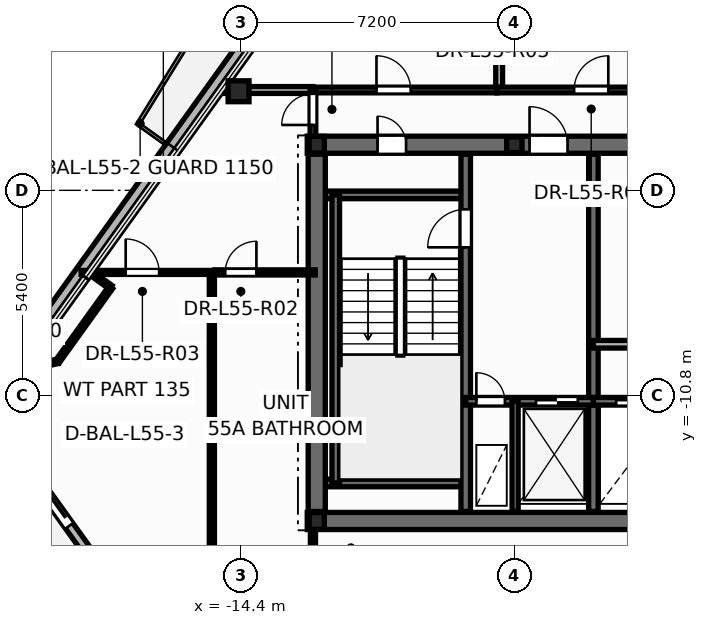
"""IFC4 building model, lengths in metres.
Left out: names, types, materials, properties, quantities, classifications, styles, units other than length and angle.
Written with IfcOpenShell. Run it as: python <this file> out.ifc"""

import sys

from ifc_helpers import new_model, si_unit, direction, frame, frame_2d, origin, origin_2d, place, context, subcontext, project, spatial, rectangle, hollow_circle, i_section, extrude, element, fill, save


model = new_model("IFC4")
c1 = context("Model", 3, precision=1e-05, world=origin(), true_north=direction((0.0, 1.0)))
c2 = subcontext(c1, "Body", "Model", "MODEL_VIEW")
j1 = project(units=[si_unit("LENGTHUNIT", "METRE"), si_unit("PLANEANGLEUNIT", "RADIAN")], contexts=[c1])
p1 = place(None, origin())
s1 = spatial("IfcSite", under=j1, at=p1, CompositionType="ELEMENT")
p2 = place(p1, origin())
s2 = spatial("IfcBuilding", under=s1, at=p2, CompositionType="ELEMENT")
p3 = place(p2, frame((0.0, 0.0, 210.9)))
s3 = spatial("IfcBuildingStorey", under=s2, at=p3, CompositionType="ELEMENT", Elevation=210.9)
p4 = place(p3, frame((-14.457, -2.793, 0.0), z_axis=(0.0, 0.0, 1.0), x_axis=(1.0, 0.0, 0.0)))
e1 = element("IfcColumn", 1, at=p4, inside=s3, PredefinedType="COLUMN", context=c2, shape_type="SweptSolid", body=[
    extrude(hollow_circle(Radius=0.275, WallThickness=0.024, at=origin_2d()), origin(), (0.0, 0.0, 1.0), 3.6),
])
for number, where, z_axis, x_axis in (
    (2, (-12.4, -14.1, 0.0), (0.0, 0.0, 1.0), (1.0, 0.0, 0.0)),
    (3, (-12.4, -4.2, 0.0), (0.0, 0.0, 1.0), (1.0, 0.0, 0.0)),
):
    element("IfcColumn", number, at=place(p3, frame(where, z_axis=z_axis, x_axis=x_axis)), inside=s3, PredefinedType="COLUMN", context=c2, shape_type="SweptSolid", body=[
        extrude(i_section(OverallWidth=0.4, OverallDepth=0.44, WebThickness=0.028, FlangeThickness=0.04, at=origin_2d()), origin(), (0.0, 0.0, 1.0), 3.6),
    ])
p5 = place(p3, frame((-7.2, -4.2, 0.0), z_axis=(0.0, 0.0, 1.0), x_axis=(1.0, 0.0, 0.0)))
e4 = element("IfcColumn", 4, at=p5, inside=s3, PredefinedType="PILASTER", context=c2, shape_type="SweptSolid", body=[
    extrude(i_section(OverallWidth=0.405, OverallDepth=0.414, WebThickness=0.022, FlangeThickness=0.032, at=origin_2d()), origin(), (0.0, 0.0, 1.0), 3.6),
])
p6 = place(p3, frame((-12.032, 1.541, -0.2), z_axis=(0.0, 0.0, 1.0), x_axis=(-0.583546701141, -0.812079582053, 0.0)))
e5 = element("IfcWall", 5, at=p6, inside=s3, PredefinedType="PARAPET", context=c2, shape_type="SweptSolid", body=[
    extrude(rectangle(XDim=15.541, YDim=0.36, at=frame_2d((7.77, 0.0))), origin(), (0.0, 0.0, 1.0), 0.38),
])
p7 = place(p3, frame((-19.976, -12.751, -0.015), z_axis=(0.0, 0.0, 1.0), x_axis=(0.5835494265, -0.812077623649, 0.0)))
e6 = element("IfcWall", 6, at=p7, inside=s3, PredefinedType="STANDARD", context=c2, shape_type="SweptSolid", body=[
    extrude(rectangle(XDim=3.833, YDim=0.24, at=frame_2d((1.917, 0.0))), origin(), (0.0, 0.0, 1.0), 2.802),
])
p8 = place(p7, frame((0.32, 0.0, 0.015)))
e7 = element("IfcOpeningElement", 7, at=p8, cuts=e6, PredefinedType="OPENING", context=c2, shape_type="SweptSolid", body=[
    extrude(rectangle(XDim=1.506, YDim=2.204, at=frame_2d((0.75, 1.102))), frame((0.0, 0.13, 0.0), z_axis=(0.0, -1.0, 0.0), x_axis=(1.0, 0.0, 0.0)), (0.0, 0.0, 1.0), 0.26),
])
p9 = place(p3, frame((-12.65, -14.1, 0.0), z_axis=(0.0, 0.0, 1.0), x_axis=(1.0, 0.0, 0.0)))
e8 = element("IfcWall", 8, at=p9, inside=s3, PredefinedType="SHEAR", context=c2, shape_type="SweptSolid", body=[
    extrude(rectangle(XDim=25.3, YDim=0.45, at=frame_2d((12.65, 0.0))), origin(), (0.0, 0.0, 1.0), 3.6),
])
p10 = place(p3, frame((-12.65, -4.2, 0.0), z_axis=(0.0, 0.0, 1.0), x_axis=(1.0, 0.0, 0.0)))
e9 = element("IfcWall", 9, at=p10, inside=s3, PredefinedType="SHEAR", context=c2, shape_type="SweptSolid", body=[
    extrude(rectangle(XDim=25.3, YDim=0.45, at=frame_2d((12.65, 0.0))), origin(), (0.0, 0.0, 1.0), 3.6),
])
p11 = place(p10, frame((1.85, 0.0, 0.0)))
e10 = element("IfcOpeningElement", 10, at=p11, cuts=e9, PredefinedType="OPENING", context=c2, shape_type="SweptSolid", body=[
    extrude(rectangle(XDim=0.756, YDim=2.054, at=frame_2d((0.375, 1.027))), frame((0.0, 0.235, 0.0), z_axis=(0.0, -1.0, 0.0), x_axis=(1.0, 0.0, 0.0)), (0.0, 0.0, 1.0), 0.47),
])
p12 = place(p10, frame((21.85, 0.0, 0.0)))
e11 = element("IfcOpeningElement", 11, at=p12, cuts=e9, PredefinedType="OPENING", context=c2, shape_type="SweptSolid", body=[
    extrude(rectangle(XDim=0.756, YDim=2.054, at=frame_2d((0.375, 1.027))), frame((0.0, 0.235, 0.0), z_axis=(0.0, -1.0, 0.0), x_axis=(1.0, 0.0, 0.0)), (0.0, 0.0, 1.0), 0.47),
])
p13 = place(p10, frame((23.5, 0.0, 0.0)))
e12 = element("IfcOpeningElement", 12, at=p13, cuts=e9, PredefinedType="OPENING", context=c2, shape_type="SweptSolid", body=[
    extrude(rectangle(XDim=0.756, YDim=2.054, at=frame_2d((0.375, 1.027))), frame((0.0, 0.235, 0.0), z_axis=(0.0, -1.0, 0.0), x_axis=(1.0, 0.0, 0.0)), (0.0, 0.0, 1.0), 0.47),
])
p14 = place(p10, frame((5.85, 0.0, 0.0)))
e13 = element("IfcOpeningElement", 13, at=p14, cuts=e9, PredefinedType="OPENING", context=c2, shape_type="SweptSolid", body=[
    extrude(rectangle(XDim=1.006, YDim=2.104, at=frame_2d((0.5, 1.052))), frame((0.0, 0.235, 0.0), z_axis=(0.0, -1.0, 0.0), x_axis=(1.0, 0.0, 0.0)), (0.0, 0.0, 1.0), 0.47),
])
p15 = place(p10, frame((10.35, 0.0, 0.0)))
e14 = element("IfcOpeningElement", 14, at=p15, cuts=e9, PredefinedType="OPENING", context=c2, shape_type="SweptSolid", body=[
    extrude(rectangle(XDim=1.406, YDim=2.154, at=frame_2d((0.7, 1.077))), frame((0.0, 0.235, 0.0), z_axis=(0.0, -1.0, 0.0), x_axis=(1.0, 0.0, 0.0)), (0.0, 0.0, 1.0), 0.47),
])
p16 = place(p10, frame((18.45, 0.0, 0.0)))
e15 = element("IfcOpeningElement", 15, at=p16, cuts=e9, PredefinedType="OPENING", context=c2, shape_type="SweptSolid", body=[
    extrude(rectangle(XDim=1.006, YDim=2.104, at=frame_2d((0.5, 1.052))), frame((0.0, 0.235, 0.0), z_axis=(0.0, -1.0, 0.0), x_axis=(1.0, 0.0, 0.0)), (0.0, 0.0, 1.0), 0.47),
])
for number, where, z_axis, x_axis in (
    (16, (-12.35, -5.52, 0.0), (0.0, 0.0, 1.0), (1.0, 0.0, 0.0)),
    (17, (-12.35, -13.1, 0.0), (0.0, 0.0, 1.0), (1.0, 0.0, 0.0)),
):
    element("IfcWall", number, at=place(p3, frame(where, z_axis=z_axis, x_axis=x_axis)), inside=s3, PredefinedType="SOLIDWALL", context=c2, shape_type="SweptSolid", body=[
        extrude(rectangle(XDim=3.87, YDim=0.2, at=frame_2d((1.935, 0.0))), origin(), (0.0, 0.0, 1.0), 3.6),
    ])
p17 = place(p3, frame((-11.9, -13.1, 0.0), z_axis=(0.0, 0.0, 1.0), x_axis=(0.0, 1.0, 0.0)))
e18 = element("IfcWall", 18, at=p17, inside=s3, PredefinedType="SOLIDWALL", context=c2, shape_type="SweptSolid", body=[
    extrude(rectangle(XDim=7.58, YDim=0.2, at=frame_2d((3.79, 0.0))), origin(), (0.0, 0.0, 1.0), 3.6),
])
p18 = place(p3, frame((-8.48, -13.85, 0.0), z_axis=(0.0, 0.0, 1.0), x_axis=(0.0, 1.0, 0.0)))
e19 = element("IfcWall", 19, at=p18, inside=s3, PredefinedType="SHEAR", context=c2, shape_type="SweptSolid", body=[
    extrude(rectangle(XDim=9.4, YDim=0.25, at=frame_2d((4.7, 0.0))), origin(), (0.0, 0.0, 1.0), 3.6),
])
p19 = place(p18, frame((6.95, 0.0, 0.0)))
e20 = element("IfcOpeningElement", 20, at=p19, cuts=e19, PredefinedType="OPENING", context=c2, shape_type="SweptSolid", body=[
    extrude(rectangle(XDim=1.006, YDim=2.104, at=frame_2d((0.5, 1.052))), frame((0.0, 0.135, 0.0), z_axis=(0.0, -1.0, 0.0), x_axis=(1.0, 0.0, 0.0)), (0.0, 0.0, 1.0), 0.27),
])
p20 = place(p3, frame((-5.12, -13.85, 0.0), z_axis=(0.0, 0.0, 1.0), x_axis=(0.0, 1.0, 0.0)))
e21 = element("IfcWall", 21, at=p20, inside=s3, PredefinedType="SHEAR", context=c2, shape_type="SweptSolid", body=[
    extrude(rectangle(XDim=9.4, YDim=0.25, at=frame_2d((4.7, 0.0))), origin(), (0.0, 0.0, 1.0), 3.6),
])
p21 = place(p3, frame((-8.48, -10.95, 0.0), z_axis=(0.0, 0.0, 1.0), x_axis=(1.0, 0.0, 0.0)))
e22 = element("IfcWall", 22, at=p21, inside=s3, PredefinedType="SOLIDWALL", context=c2, shape_type="SweptSolid", body=[
    extrude(rectangle(XDim=3.36, YDim=0.2, at=frame_2d((1.68, 0.0))), origin(), (0.0, 0.0, 1.0), 3.6),
])
p22 = place(p21, frame((0.28, 0.0, 0.0)))
e23 = element("IfcOpeningElement", 23, at=p22, cuts=e22, PredefinedType="OPENING", context=c2, shape_type="SweptSolid", body=[
    extrude(rectangle(XDim=0.756, YDim=2.054, at=frame_2d((0.375, 1.027))), frame((0.0, 0.11, 0.0), z_axis=(0.0, -1.0, 0.0), x_axis=(1.0, 0.0, 0.0)), (0.0, 0.0, 1.0), 0.22),
])
p23 = place(p21, frame((1.85, 0.0, 0.0)))
e24 = element("IfcOpeningElement", 24, at=p23, cuts=e22, PredefinedType="OPENING", context=c2, shape_type="SweptSolid", body=[
    extrude(rectangle(XDim=1.106, YDim=2.104, at=frame_2d((0.55, 1.052))), frame((0.0, 0.11, 0.0), z_axis=(0.0, -1.0, 0.0), x_axis=(1.0, 0.0, 0.0)), (0.0, 0.0, 1.0), 0.22),
])
p24 = place(p3, frame((-5.12, -10.95, 0.0), z_axis=(0.0, 0.0, 1.0), x_axis=(1.0, 0.0, 0.0)))
e25 = element("IfcWall", 25, at=p24, inside=s3, PredefinedType="SOLIDWALL", context=c2, shape_type="SweptSolid", body=[
    extrude(rectangle(XDim=10.24, YDim=0.2, at=frame_2d((5.12, 0.0))), origin(), (0.0, 0.0, 1.0), 3.6),
])
p25 = place(p24, frame((0.6, 0.0, 0.0)))
e26 = element("IfcOpeningElement", 26, at=p25, cuts=e25, PredefinedType="OPENING", context=c2, shape_type="SweptSolid", body=[
    extrude(rectangle(XDim=1.106, YDim=2.104, at=frame_2d((0.55, 1.052))), frame((0.0, 0.11, 0.0), z_axis=(0.0, -1.0, 0.0), x_axis=(1.0, 0.0, 0.0)), (0.0, 0.0, 1.0), 0.22),
])
p26 = place(p24, frame((2.67, 0.0, 0.0)))
e27 = element("IfcOpeningElement", 27, at=p26, cuts=e25, PredefinedType="OPENING", context=c2, shape_type="SweptSolid", body=[
    extrude(rectangle(XDim=1.106, YDim=2.104, at=frame_2d((0.55, 1.052))), frame((0.0, 0.11, 0.0), z_axis=(0.0, -1.0, 0.0), x_axis=(1.0, 0.0, 0.0)), (0.0, 0.0, 1.0), 0.22),
])
p27 = place(p24, frame((4.57, 0.0, 0.0)))
e28 = element("IfcOpeningElement", 28, at=p27, cuts=e25, PredefinedType="OPENING", context=c2, shape_type="SweptSolid", body=[
    extrude(rectangle(XDim=1.106, YDim=2.104, at=frame_2d((0.55, 1.052))), frame((0.0, 0.11, 0.0), z_axis=(0.0, -1.0, 0.0), x_axis=(1.0, 0.0, 0.0)), (0.0, 0.0, 1.0), 0.22),
])
p28 = place(p24, frame((6.47, 0.0, 0.0)))
e29 = element("IfcOpeningElement", 29, at=p28, cuts=e25, PredefinedType="OPENING", context=c2, shape_type="SweptSolid", body=[
    extrude(rectangle(XDim=1.106, YDim=2.104, at=frame_2d((0.55, 1.052))), frame((0.0, 0.11, 0.0), z_axis=(0.0, -1.0, 0.0), x_axis=(1.0, 0.0, 0.0)), (0.0, 0.0, 1.0), 0.22),
])
p29 = place(p24, frame((8.54, 0.0, 0.0)))
e30 = element("IfcOpeningElement", 30, at=p29, cuts=e25, PredefinedType="OPENING", context=c2, shape_type="SweptSolid", body=[
    extrude(rectangle(XDim=1.106, YDim=2.104, at=frame_2d((0.55, 1.052))), frame((0.0, 0.11, 0.0), z_axis=(0.0, -1.0, 0.0), x_axis=(1.0, 0.0, 0.0)), (0.0, 0.0, 1.0), 0.22),
])
p30 = place(p3, frame((-7.18, -13.85, 0.0), z_axis=(0.0, 0.0, 1.0), x_axis=(0.0, 1.0, 0.0)))
e31 = element("IfcWall", 31, at=p30, inside=s3, PredefinedType="PARTITIONING", context=c2, shape_type="SweptSolid", body=[
    extrude(rectangle(XDim=2.9, YDim=0.16, at=frame_2d((1.45, 0.0))), origin(), (0.0, 0.0, 1.0), 2.47),
])
p31 = place(p3, frame((-12.4, -13.85, 0.0), z_axis=(0.0, 0.0, 1.0), x_axis=(0.0, 1.0, 0.0)))
e32 = element("IfcWall", 32, at=p31, inside=s3, PredefinedType="SHEAR", context=c2, shape_type="SweptSolid", body=[
    extrude(rectangle(XDim=9.4, YDim=0.45, at=frame_2d((4.7, 0.0))), origin(), (0.0, 0.0, 1.0), 3.6),
])
p32 = place(p3, frame((-5.12, -9.45, 0.0), z_axis=(0.0, 0.0, 1.0), x_axis=(1.0, 0.0, 0.0)))
e33 = element("IfcWall", 33, at=p32, inside=s3, PredefinedType="SOLIDWALL", context=c2, shape_type="SweptSolid", body=[
    extrude(rectangle(XDim=2.24, YDim=0.2, at=frame_2d((1.12, 0.0))), origin(), (0.0, 0.0, 1.0), 3.345),
])
p33 = place(p3, frame((-15.16, -15.897, 0.0), z_axis=(0.0, 0.0, 1.0), x_axis=(0.0, 1.0, 0.0)))
e34 = element("IfcWall", 34, at=p33, inside=s3, PredefinedType="PARTITIONING", context=c2, shape_type="SweptSolid", body=[
    extrude(rectangle(XDim=8.337, YDim=0.135, at=frame_2d((4.168, 0.0))), origin(), (0.0, 0.0, 1.0), 2.787),
])
p34 = place(p3, frame((-7.6, -2.76, 0.0), z_axis=(0.0, 0.0, 1.0), x_axis=(0.0, 1.0, 0.0)))
e35 = element("IfcWall", 35, at=p34, inside=s3, PredefinedType="PARTITIONING", context=c2, shape_type="SweptSolid", body=[
    extrude(rectangle(XDim=10.195, YDim=0.18, at=frame_2d((5.098, 0.0))), origin(), (0.0, 0.0, 1.0), 2.62),
])
p35 = place(p3, frame((-7.66, -2.76, 0.0), z_axis=(0.0, 0.0, 1.0), x_axis=(1.0, 0.0, 0.0)))
e36 = element("IfcWall", 36, at=p35, inside=s3, PredefinedType="PARTITIONING", context=c2, shape_type="SweptSolid", body=[
    extrude(rectangle(XDim=6.12, YDim=0.15, at=frame_2d((3.06, 0.0))), origin(), (0.0, 0.0, 1.0), 2.32),
])
p36 = place(p35, frame((2.032, 0.0, 0.0)))
e37 = element("IfcOpeningElement", 37, at=p36, cuts=e36, PredefinedType="OPENING", context=c2, shape_type="SweptSolid", body=[
    extrude(rectangle(XDim=0.906, YDim=2.104, at=frame_2d((0.45, 1.052))), frame((0.0, 0.085, 0.0), z_axis=(0.0, -1.0, 0.0), x_axis=(1.0, 0.0, 0.0)), (0.0, 0.0, 1.0), 0.17),
])
p37 = place(p3, frame((-12.5, -2.76, 0.0), z_axis=(0.0, 0.0, 1.0), x_axis=(1.0, 0.0, 0.0)))
e38 = element("IfcWall", 38, at=p37, inside=s3, PredefinedType="PARTITIONING", context=c2, shape_type="SweptSolid", body=[
    extrude(rectangle(XDim=4.838, YDim=0.15, at=frame_2d((2.419, 0.0))), origin(), (0.0, 0.0, 1.0), 3.345),
])
p38 = place(p37, frame((1.672, 0.0, 0.0)))
e39 = element("IfcOpeningElement", 39, at=p38, cuts=e38, PredefinedType="OPENING", context=c2, shape_type="SweptSolid", body=[
    extrude(rectangle(XDim=0.906, YDim=2.104, at=frame_2d((0.45, 1.052))), frame((0.0, 0.085, 0.0), z_axis=(0.0, -1.0, 0.0), x_axis=(1.0, 0.0, 0.0)), (0.0, 0.0, 1.0), 0.17),
])
p39 = place(p3, frame((-18.6, -7.56, 0.0), z_axis=(0.0, 0.0, 1.0), x_axis=(1.0, 0.0, 0.0)))
e40 = element("IfcWall", 40, at=p39, inside=s3, PredefinedType="PARTITIONING", context=c2, shape_type="SweptSolid", body=[
    extrude(rectangle(XDim=3.52, YDim=0.105, at=frame_2d((1.76, 0.0))), origin(), (0.0, 0.0, 1.0), 2.32),
])
p40 = place(p39, frame((1.172, 0.0, 0.0)))
e41 = element("IfcOpeningElement", 41, at=p40, cuts=e40, PredefinedType="OPENING", context=c2, shape_type="SweptSolid", body=[
    extrude(rectangle(XDim=0.886, YDim=2.104, at=frame_2d((0.44, 1.052))), frame((0.0, 0.062, 0.0), z_axis=(0.0, -1.0, 0.0), x_axis=(1.0, 0.0, 0.0)), (0.0, 0.0, 1.0), 0.125),
])
p41 = place(p3, frame((-15.078, -7.56, 0.0), z_axis=(0.0, 0.0, 1.0), x_axis=(1.0, 0.0, 0.0)))
e42 = element("IfcWall", 42, at=p41, inside=s3, PredefinedType="PARTITIONING", context=c2, shape_type="SweptSolid", body=[
    extrude(rectangle(XDim=2.638, YDim=0.135, at=frame_2d((1.319, 0.0))), origin(), (0.0, 0.0, 1.0), 2.787),
])
p42 = place(p41, frame((0.271, 0.0, 0.0)))
e43 = element("IfcOpeningElement", 43, at=p42, cuts=e42, PredefinedType="OPENING", context=c2, shape_type="SweptSolid", body=[
    extrude(rectangle(XDim=0.826, YDim=2.104, at=frame_2d((0.41, 1.052))), frame((0.0, 0.078, 0.0), z_axis=(0.0, -1.0, 0.0), x_axis=(1.0, 0.0, 0.0)), (0.0, 0.0, 1.0), 0.155),
])
p43 = place(p3, frame((-14.926, -2.76, 0.0), z_axis=(0.0, 0.0, 1.0), x_axis=(1.0, 0.0, 0.0)))
e44 = element("IfcWall", 44, at=p43, inside=s3, PredefinedType="PARTITIONING", context=c2, shape_type="SweptSolid", body=[
    extrude(rectangle(XDim=2.426, YDim=0.18, at=frame_2d((1.213, 0.0))), origin(), (0.0, 0.0, 1.0), 2.62),
])
p44 = place(p3, frame((-17.82, -7.953, 0.0), z_axis=(0.0, 0.0, 1.0), x_axis=(-0.583516561227, -0.812101239239, 0.0)))
e45 = element("IfcWall", 45, at=p44, inside=s3, PredefinedType="PARTITIONING", context=c2, shape_type="SweptSolid", body=[
    extrude(rectangle(XDim=2.4, YDim=0.12, at=frame_2d((1.2, 0.0))), origin(), (0.0, 0.0, 1.0), 2.32),
])
p45 = place(p3, frame((-12.5, -4.24, 0.0), z_axis=(0.0, 0.0, 1.0), x_axis=(0.0, 1.0, 0.0)))
e46 = element("IfcWall", 46, at=p45, inside=s3, PredefinedType="PARTITIONING", context=c2, shape_type="SweptSolid", body=[
    extrude(rectangle(XDim=1.48, YDim=0.15, at=frame_2d((0.74, 0.0))), origin(), (0.0, 0.0, 1.0), 2.32),
])
p46 = place(p45, frame((0.56, 0.0, 0.0)))
e47 = element("IfcOpeningElement", 47, at=p46, cuts=e46, PredefinedType="OPENING", context=c2, shape_type="SweptSolid", body=[
    extrude(rectangle(XDim=0.826, YDim=2.104, at=frame_2d((0.41, 1.052))), frame((0.0, 0.085, 0.0), z_axis=(0.0, -1.0, 0.0), x_axis=(1.0, 0.0, 0.0)), (0.0, 0.0, 1.0), 0.17),
])
p47 = place(p3, frame((-19.22, -9.902, 0.0), z_axis=(0.0, 0.0, 1.0), x_axis=(-0.976395829015, -0.215988854068, 0.0)))
e48 = element("IfcWall", 48, at=p47, inside=s3, PredefinedType="PARTITIONING", context=c2, shape_type="SweptSolid", body=[
    extrude(rectangle(XDim=0.851, YDim=0.12, at=frame_2d((0.426, 0.0))), origin(), (0.0, 0.0, 1.0), 2.32),
])
p48 = place(p3, frame((-18.364, -7.562, 0.0), z_axis=(0.0, 0.0, 1.0), x_axis=(0.811907418628, -0.583786213932, 0.0)))
e49 = element("IfcWall", 49, at=p48, inside=s3, PredefinedType="PARTITIONING", context=c2, shape_type="SweptSolid", body=[
    extrude(rectangle(XDim=0.67, YDim=0.12, at=frame_2d((0.335, 0.0))), origin(), (0.0, 0.0, 1.0), 2.787),
])
p49 = place(p3, frame((-12.5, -14.4, 0.0), z_axis=(0.0, 0.0, 1.0), x_axis=(0.0, -1.0, 0.0)))
e50 = element("IfcWall", 50, at=p49, inside=s3, PredefinedType="PARTITIONING", context=c2, shape_type="SweptSolid", body=[
    extrude(rectangle(XDim=0.637, YDim=0.135, at=frame_2d((0.318, 0.0))), origin(), (0.0, 0.0, 1.0), 3.345),
])
p50 = place(p8, origin())
e51 = element("IfcDoor", 51, at=p50, inside=s3, OperationType="SLIDING_TO_RIGHT", PredefinedType="DOOR", context=c2, shape_type="SweptSolid", body=[
    extrude(rectangle(XDim=1.5, YDim=2.2, at=frame_2d((0.75, 1.1))), frame((0.0, 0.025, 0.0), z_axis=(0.0, -1.0, 0.0), x_axis=(1.0, 0.0, 0.0)), (0.0, 0.0, 1.0), 0.05),
])
fill(e7, e51)
p51 = place(p19, origin())
e52 = element("IfcDoor", 52, at=p51, inside=s3, OperationType="SINGLE_SWING_LEFT", PredefinedType="DOOR", context=c2, shape_type="SweptSolid", body=[
    extrude(rectangle(XDim=1.0, YDim=2.1, at=frame_2d((0.5, 1.05))), frame((0.0, 0.025, 0.0), z_axis=(0.0, -1.0, 0.0), x_axis=(1.0, 0.0, 0.0)), (0.0, 0.0, 1.0), 0.05),
])
fill(e20, e52)
p52 = place(p22, origin())
e53 = element("IfcDoor", 53, at=p52, inside=s3, OperationType="SINGLE_SWING_LEFT", PredefinedType="DOOR", context=c2, shape_type="SweptSolid", body=[
    extrude(rectangle(XDim=0.75, YDim=2.05, at=frame_2d((0.375, 1.025))), frame((0.0, 0.025, 0.0), z_axis=(0.0, -1.0, 0.0), x_axis=(1.0, 0.0, 0.0)), (0.0, 0.0, 1.0), 0.05),
])
fill(e23, e53)
p53 = place(p23, origin())
e54 = element("IfcDoor", 54, at=p53, inside=s3, OperationType="DOUBLE_DOOR_SLIDING", PredefinedType="DOOR", context=c2, shape_type="SweptSolid", body=[
    extrude(rectangle(XDim=1.1, YDim=2.1, at=frame_2d((0.55, 1.05))), frame((0.0, 0.025, 0.0), z_axis=(0.0, -1.0, 0.0), x_axis=(1.0, 0.0, 0.0)), (0.0, 0.0, 1.0), 0.05),
])
fill(e24, e54)
p54 = place(p25, origin())
e55 = element("IfcDoor", 55, at=p54, inside=s3, OperationType="DOUBLE_DOOR_SLIDING", PredefinedType="DOOR", context=c2, shape_type="SweptSolid", body=[
    extrude(rectangle(XDim=1.1, YDim=2.1, at=frame_2d((0.55, 1.05))), frame((0.0, 0.025, 0.0), z_axis=(0.0, -1.0, 0.0), x_axis=(1.0, 0.0, 0.0)), (0.0, 0.0, 1.0), 0.05),
])
fill(e26, e55)
p55 = place(p11, origin())
e56 = element("IfcDoor", 56, at=p55, inside=s3, OperationType="SINGLE_SWING_LEFT", PredefinedType="DOOR", context=c2, shape_type="SweptSolid", body=[
    extrude(rectangle(XDim=0.75, YDim=2.05, at=frame_2d((0.375, 1.025))), frame((0.0, 0.025, 0.0), z_axis=(0.0, -1.0, 0.0), x_axis=(1.0, 0.0, 0.0)), (0.0, 0.0, 1.0), 0.05),
])
fill(e10, e56)
p56 = place(p14, origin())
e57 = element("IfcDoor", 57, at=p56, inside=s3, OperationType="SINGLE_SWING_LEFT", PredefinedType="DOOR", context=c2, shape_type="SweptSolid", body=[
    extrude(rectangle(XDim=1.0, YDim=2.1, at=frame_2d((0.5, 1.05))), frame((0.0, 0.025, 0.0), z_axis=(0.0, -1.0, 0.0), x_axis=(1.0, 0.0, 0.0)), (0.0, 0.0, 1.0), 0.05),
])
fill(e13, e57)
p57 = place(p46, origin())
e58 = element("IfcDoor", 58, at=p57, inside=s3, OperationType="SINGLE_SWING_LEFT", PredefinedType="DOOR", context=c2, shape_type="SweptSolid", body=[
    extrude(rectangle(XDim=0.82, YDim=2.1, at=frame_2d((0.41, 1.05))), frame((0.0, 0.025, 0.0), z_axis=(0.0, -1.0, 0.0), x_axis=(1.0, 0.0, 0.0)), (0.0, 0.0, 1.0), 0.05),
])
fill(e47, e58)
p58 = place(p42, origin())
e59 = element("IfcDoor", 59, at=p58, inside=s3, OperationType="SINGLE_SWING_RIGHT", PredefinedType="DOOR", context=c2, shape_type="SweptSolid", body=[
    extrude(rectangle(XDim=0.82, YDim=2.1, at=frame_2d((0.41, 1.05))), frame((0.0, 0.025, 0.0), z_axis=(0.0, -1.0, 0.0), x_axis=(1.0, 0.0, 0.0)), (0.0, 0.0, 1.0), 0.05),
])
fill(e43, e59)
p59 = place(p40, origin())
e60 = element("IfcDoor", 60, at=p59, inside=s3, OperationType="SINGLE_SWING_LEFT", PredefinedType="DOOR", context=c2, shape_type="SweptSolid", body=[
    extrude(rectangle(XDim=0.88, YDim=2.1, at=frame_2d((0.44, 1.05))), frame((0.0, 0.025, 0.0), z_axis=(0.0, -1.0, 0.0), x_axis=(1.0, 0.0, 0.0)), (0.0, 0.0, 1.0), 0.05),
])
fill(e41, e60)
p60 = place(p38, origin())
e61 = element("IfcDoor", 61, at=p60, inside=s3, OperationType="SINGLE_SWING_LEFT", PredefinedType="DOOR", context=c2, shape_type="SweptSolid", body=[
    extrude(rectangle(XDim=0.9, YDim=2.1, at=frame_2d((0.45, 1.05))), frame((0.0, 0.025, 0.0), z_axis=(0.0, -1.0, 0.0), x_axis=(1.0, 0.0, 0.0)), (0.0, 0.0, 1.0), 0.05),
])
fill(e39, e61)
p61 = place(p36, origin())
e62 = element("IfcDoor", 62, at=p61, inside=s3, OperationType="SINGLE_SWING_RIGHT", PredefinedType="DOOR", context=c2, shape_type="SweptSolid", body=[
    extrude(rectangle(XDim=0.9, YDim=2.1, at=frame_2d((0.45, 1.05))), frame((0.0, 0.025, 0.0), z_axis=(0.0, -1.0, 0.0), x_axis=(1.0, 0.0, 0.0)), (0.0, 0.0, 1.0), 0.05),
])
fill(e37, e62)
save(model, sys.argv[1])
